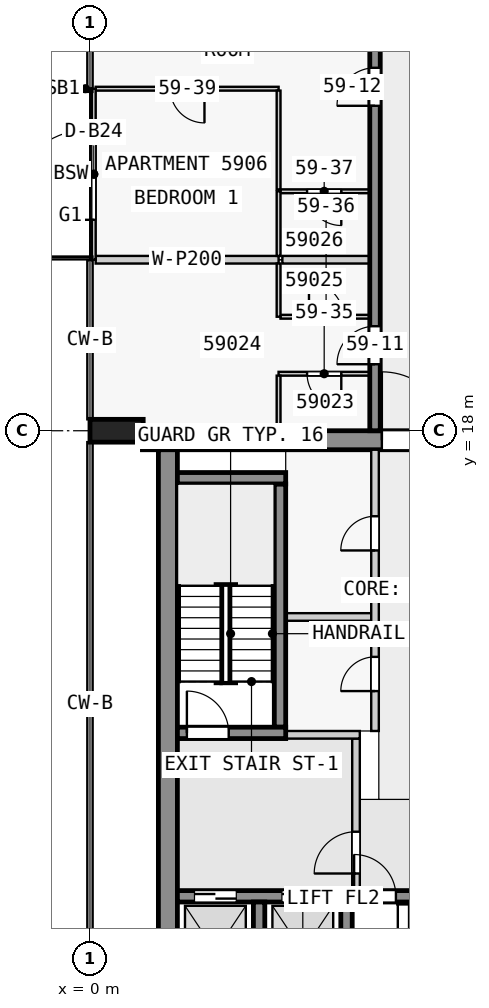
"""IFC4 building model, lengths in metres.
Left out: names, types, materials, properties, quantities, classifications, styles, units other than length and angle.
Written with IfcOpenShell. Run it as: python <this file> out.ifc"""

import sys

from ifc_helpers import new_model, si_unit, direction, frame, frame_2d, origin, origin_2d, place, context, subcontext, project, spatial, rectangle, extrude, element, fill, save


model = new_model("IFC4")
c1 = context("Model", 3, precision=1e-05, world=origin(), true_north=direction((0.0, 1.0)))
c2 = subcontext(c1, "Body", "Model", "MODEL_VIEW")
j1 = project(units=[si_unit("LENGTHUNIT", "METRE"), si_unit("PLANEANGLEUNIT", "RADIAN")], contexts=[c1])
p1 = place(None, origin())
s1 = spatial("IfcSite", under=j1, at=p1, CompositionType="ELEMENT")
p2 = place(p1, origin())
s2 = spatial("IfcBuilding", under=s1, at=p2, CompositionType="ELEMENT")
p3 = place(p2, frame((0.0, 0.0, 225.9)))
s3 = spatial("IfcBuildingStorey", under=s2, at=p3, CompositionType="ELEMENT", Elevation=225.9)
p4 = place(p3, frame((0.7, 18.0, 0.0), z_axis=(0.0, 0.0, 1.0), x_axis=(0.0, 1.0, 0.0)))
e1 = element("IfcColumn", 1, at=p4, inside=s3, PredefinedType="COLUMN", context=c2, shape_type="SweptSolid", body=[
    extrude(rectangle(XDim=0.6, YDim=1.4, at=origin_2d()), origin(), (0.0, 0.0, 1.0), 3.5),
])
p5 = place(p3, frame((1.38, 17.75, 0.0), z_axis=(0.0, 0.0, 1.0), x_axis=(1.0, 0.0, 0.0)))
e2 = element("IfcWall", 2, at=p5, inside=s3, PredefinedType="SHEAR", context=c2, shape_type="SweptSolid", body=[
    extrude(rectangle(XDim=21.12, YDim=0.5, at=frame_2d((10.56, 0.0))), origin(), (0.0, 0.0, 1.0), 3.05),
])
p6 = place(p5, frame((6.3, 0.0, 0.0)))
e3 = element("IfcOpeningElement", 3, at=p6, cuts=e2, PredefinedType="OPENING", context=c2, shape_type="SweptSolid", body=[
    extrude(rectangle(XDim=1.8, YDim=2.1, at=frame_2d((0.9, 1.05))), frame((0.0, 0.26, 0.0), z_axis=(0.0, -1.0, 0.0), x_axis=(1.0, 0.0, 0.0)), (0.0, 0.0, 1.0), 0.52),
])
p7 = place(p3, frame((2.05, 2.5, 0.0), z_axis=(0.0, 0.0, 1.0), x_axis=(0.0, 1.0, 0.0)))
e4 = element("IfcWall", 4, at=p7, inside=s3, PredefinedType="SHEAR", context=c2, shape_type="SweptSolid", body=[
    extrude(rectangle(XDim=15.0, YDim=0.5, at=frame_2d((7.5, 0.0))), origin(), (0.0, 0.0, 1.0), 3.05),
])
for number, where, z_axis, x_axis in (
    (5, (4.45, 2.8, 0.0), (0.0, 0.0, 1.0), (0.0, 1.0, 0.0)),
    (6, (6.75, 2.8, 0.0), (0.0, 0.0, 1.0), (0.0, 1.0, 0.0)),
):
    element("IfcWall", number, at=place(p3, frame(where, z_axis=z_axis, x_axis=x_axis)), inside=s3, PredefinedType="SHEAR", context=c2, shape_type="SweptSolid", body=[
        extrude(rectangle(XDim=2.8, YDim=0.3, at=frame_2d((1.4, 0.0))), origin(), (0.0, 0.0, 1.0), 3.05),
    ])
p8 = place(p3, frame((2.3, 5.75, 0.0), z_axis=(0.0, 0.0, 1.0), x_axis=(1.0, 0.0, 0.0)))
e7 = element("IfcWall", 7, at=p8, inside=s3, PredefinedType="SHEAR", context=c2, shape_type="SweptSolid", body=[
    extrude(rectangle(XDim=18.8, YDim=0.3, at=frame_2d((9.4, 0.0))), origin(), (0.0, 0.0, 1.0), 3.05),
])
p9 = place(p8, frame((4.65, 0.0, 0.0)))
e8 = element("IfcOpeningElement", 8, at=p9, cuts=e7, PredefinedType="OPENING", context=c2, shape_type="SweptSolid", body=[
    extrude(rectangle(XDim=1.1, YDim=2.1, at=frame_2d((0.55, 1.05))), frame((0.0, 0.16, 0.0), z_axis=(0.0, -1.0, 0.0), x_axis=(1.0, 0.0, 0.0)), (0.0, 0.0, 1.0), 0.32),
])
p10 = place(p8, frame((0.45, 0.0, 0.0)))
e9 = element("IfcOpeningElement", 9, at=p10, cuts=e7, PredefinedType="OPENING", context=c2, shape_type="SweptSolid", body=[
    extrude(rectangle(XDim=1.1, YDim=2.1, at=frame_2d((0.55, 1.05))), frame((0.0, 0.16, 0.0), z_axis=(0.0, -1.0, 0.0), x_axis=(1.0, 0.0, 0.0)), (0.0, 0.0, 1.0), 0.32),
])
p11 = place(p8, frame((2.75, 0.0, 0.0)))
e10 = element("IfcOpeningElement", 10, at=p11, cuts=e7, PredefinedType="OPENING", context=c2, shape_type="SweptSolid", body=[
    extrude(rectangle(XDim=1.1, YDim=2.1, at=frame_2d((0.55, 1.05))), frame((0.0, 0.16, 0.0), z_axis=(0.0, -1.0, 0.0), x_axis=(1.0, 0.0, 0.0)), (0.0, 0.0, 1.0), 0.32),
])
p12 = place(p8, frame((11.95, 0.0, 0.0)))
e11 = element("IfcOpeningElement", 11, at=p12, cuts=e7, PredefinedType="OPENING", context=c2, shape_type="SweptSolid", body=[
    extrude(rectangle(XDim=0.9, YDim=2.1, at=frame_2d((0.45, 1.05))), frame((0.0, 0.16, 0.0), z_axis=(0.0, -1.0, 0.0), x_axis=(1.0, 0.0, 0.0)), (0.0, 0.0, 1.0), 0.32),
])
p13 = place(p8, frame((15.7, 0.0, 0.0)))
e12 = element("IfcOpeningElement", 12, at=p13, cuts=e7, PredefinedType="OPENING", context=c2, shape_type="SweptSolid", body=[
    extrude(rectangle(XDim=0.9, YDim=2.1, at=frame_2d((0.45, 1.05))), frame((0.0, 0.16, 0.0), z_axis=(0.0, -1.0, 0.0), x_axis=(1.0, 0.0, 0.0)), (0.0, 0.0, 1.0), 0.32),
])
p14 = place(p3, frame((2.3, 10.05, 0.0), z_axis=(0.0, 0.0, 1.0), x_axis=(1.0, 0.0, 0.0)))
e13 = element("IfcWall", 13, at=p14, inside=s3, PredefinedType="SHEAR", context=c2, shape_type="SweptSolid", body=[
    extrude(rectangle(XDim=2.85, YDim=0.3, at=frame_2d((1.425, 0.0))), origin(), (0.0, 0.0, 1.0), 3.05),
])
p15 = place(p14, frame((0.25, 0.0, 0.0)))
e14 = element("IfcOpeningElement", 14, at=p15, cuts=e13, PredefinedType="OPENING", context=c2, shape_type="SweptSolid", body=[
    extrude(rectangle(XDim=1.1, YDim=2.1, at=frame_2d((0.55, 1.05))), frame((0.0, 0.16, 0.0), z_axis=(0.0, -1.0, 0.0), x_axis=(1.0, 0.0, 0.0)), (0.0, 0.0, 1.0), 0.32),
])
p16 = place(p3, frame((5.0, 10.2, 0.0), z_axis=(0.0, 0.0, 1.0), x_axis=(0.0, 1.0, 0.0)))
e15 = element("IfcWall", 15, at=p16, inside=s3, PredefinedType="SHEAR", context=c2, shape_type="SweptSolid", body=[
    extrude(rectangle(XDim=6.4, YDim=0.3, at=frame_2d((3.2, 0.0))), origin(), (0.0, 0.0, 1.0), 3.05),
])
p17 = place(p3, frame((2.3, 16.75, 0.0), z_axis=(0.0, 0.0, 1.0), x_axis=(1.0, 0.0, 0.0)))
e16 = element("IfcWall", 16, at=p17, inside=s3, PredefinedType="SHEAR", context=c2, shape_type="SweptSolid", body=[
    extrude(rectangle(XDim=2.85, YDim=0.3, at=frame_2d((1.425, 0.0))), origin(), (0.0, 0.0, 1.0), 3.05),
])
p18 = place(p3, frame((7.5, 18.0, 0.0), z_axis=(0.0, 0.0, 1.0), x_axis=(0.0, 1.0, 0.0)))
e17 = element("IfcWall", 17, at=p18, inside=s3, PredefinedType="SHEAR", context=c2, shape_type="SweptSolid", body=[
    extrude(rectangle(XDim=27.0, YDim=0.275, at=frame_2d((13.5, 0.0))), origin(), (0.0, 0.0, 1.0), 3.05),
])
p19 = place(p18, frame((1.75, 0.0, 0.0)))
e18 = element("IfcOpeningElement", 18, at=p19, cuts=e17, PredefinedType="OPENING", context=c2, shape_type="SweptSolid", body=[
    extrude(rectangle(XDim=1.0, YDim=2.1, at=frame_2d((0.5, 1.05))), frame((0.0, 0.147, 0.0), z_axis=(0.0, -1.0, 0.0), x_axis=(1.0, 0.0, 0.0)), (0.0, 0.0, 1.0), 0.295),
])
p20 = place(p18, frame((8.55, 0.0, 0.0)))
e19 = element("IfcOpeningElement", 19, at=p20, cuts=e17, PredefinedType="OPENING", context=c2, shape_type="SweptSolid", body=[
    extrude(rectangle(XDim=1.0, YDim=2.1, at=frame_2d((0.5, 1.05))), frame((0.0, 0.147, 0.0), z_axis=(0.0, -1.0, 0.0), x_axis=(1.0, 0.0, 0.0)), (0.0, 0.0, 1.0), 0.295),
])
p21 = place(p18, frame((17.55, 0.0, 0.0)))
e20 = element("IfcOpeningElement", 20, at=p21, cuts=e17, PredefinedType="OPENING", context=c2, shape_type="SweptSolid", body=[
    extrude(rectangle(XDim=1.0, YDim=2.1, at=frame_2d((0.5, 1.05))), frame((0.0, 0.147, 0.0), z_axis=(0.0, -1.0, 0.0), x_axis=(1.0, 0.0, 0.0)), (0.0, 0.0, 1.0), 0.295),
])
p22 = place(p18, frame((23.25, 0.0, 0.0)))
e21 = element("IfcOpeningElement", 21, at=p22, cuts=e17, PredefinedType="OPENING", context=c2, shape_type="SweptSolid", body=[
    extrude(rectangle(XDim=0.9, YDim=2.1, at=frame_2d((0.45, 1.05))), frame((0.0, 0.147, 0.0), z_axis=(0.0, -1.0, 0.0), x_axis=(1.0, 0.0, 0.0)), (0.0, 0.0, 1.0), 0.295),
])
p23 = place(p18, frame((25.45, 0.0, 0.0)))
e22 = element("IfcOpeningElement", 22, at=p23, cuts=e17, PredefinedType="OPENING", context=c2, shape_type="SweptSolid", body=[
    extrude(rectangle(XDim=1.0, YDim=2.1, at=frame_2d((0.5, 1.05))), frame((0.0, 0.147, 0.0), z_axis=(0.0, -1.0, 0.0), x_axis=(1.0, 0.0, 0.0)), (0.0, 0.0, 1.0), 0.295),
])
p24 = place(p3, frame((0.1, 22.5, 0.0), z_axis=(0.0, 0.0, 1.0), x_axis=(0.0, 1.0, 0.0)))
e23 = element("IfcWall", 23, at=p24, inside=s3, PredefinedType="STANDARD", context=c2, shape_type="SweptSolid", body=[
    extrude(rectangle(XDim=4.5, YDim=0.1, at=frame_2d((2.25, 0.0))), origin(), (0.0, 0.0, 1.0), 3.05),
])
p25 = place(p24, frame((1.05, 0.0, 0.0)))
e24 = element("IfcOpeningElement", 24, at=p25, cuts=e23, PredefinedType="OPENING", context=c2, shape_type="SweptSolid", body=[
    extrude(rectangle(XDim=2.4, YDim=2.4, at=frame_2d((1.2, 1.2))), frame((0.0, 0.06, 0.0), z_axis=(0.0, -1.0, 0.0), x_axis=(1.0, 0.0, 0.0)), (0.0, 0.0, 1.0), 0.12),
])
p26 = place(p3, frame((7.0, 5.9, 0.0), z_axis=(0.0, 0.0, 1.0), x_axis=(0.0, 1.0, 0.0)))
e25 = element("IfcWall", 25, at=p26, inside=s3, PredefinedType="PARTITIONING", context=c2, shape_type="SweptSolid", body=[
    extrude(rectangle(XDim=4.0, YDim=0.2, at=frame_2d((2.0, 0.0))), origin(), (0.0, 0.0, 1.0), 3.05),
])
p27 = place(p26, frame((0.45, 0.0, 0.0)))
e26 = element("IfcOpeningElement", 26, at=p27, cuts=e25, PredefinedType="OPENING", context=c2, shape_type="SweptSolid", body=[
    extrude(rectangle(XDim=1.1, YDim=2.1, at=frame_2d((0.55, 1.05))), frame((0.0, 0.11, 0.0), z_axis=(0.0, -1.0, 0.0), x_axis=(1.0, 0.0, 0.0)), (0.0, 0.0, 1.0), 0.22),
])
p28 = place(p3, frame((5.15, 10.0, 0.0), z_axis=(0.0, 0.0, 1.0), x_axis=(1.0, 0.0, 0.0)))
e27 = element("IfcWall", 27, at=p28, inside=s3, PredefinedType="PARTITIONING", context=c2, shape_type="SweptSolid", body=[
    extrude(rectangle(XDim=1.95, YDim=0.2, at=frame_2d((0.975, 0.0))), origin(), (0.0, 0.0, 1.0), 3.05),
])
p29 = place(p3, frame((7.5, 10.1, 0.0), z_axis=(0.0, 0.0, 1.0), x_axis=(0.0, 1.0, 0.0)))
e28 = element("IfcWall", 28, at=p29, inside=s3, PredefinedType="PARTITIONING", context=c2, shape_type="SweptSolid", body=[
    extrude(rectangle(XDim=7.4, YDim=0.2, at=frame_2d((3.7, 0.0))), origin(), (0.0, 0.0, 1.0), 3.05),
])
p30 = place(p29, frame((1.05, 0.0, 0.0)))
e29 = element("IfcOpeningElement", 29, at=p30, cuts=e28, PredefinedType="OPENING", context=c2, shape_type="SweptSolid", body=[
    extrude(rectangle(XDim=0.9, YDim=2.1, at=frame_2d((0.45, 1.05))), frame((0.0, 0.11, 0.0), z_axis=(0.0, -1.0, 0.0), x_axis=(1.0, 0.0, 0.0)), (0.0, 0.0, 1.0), 0.22),
])
p31 = place(p29, frame((4.75, 0.0, 0.0)))
e30 = element("IfcOpeningElement", 30, at=p31, cuts=e28, PredefinedType="OPENING", context=c2, shape_type="SweptSolid", body=[
    extrude(rectangle(XDim=0.9, YDim=2.1, at=frame_2d((0.45, 1.05))), frame((0.0, 0.11, 0.0), z_axis=(0.0, -1.0, 0.0), x_axis=(1.0, 0.0, 0.0)), (0.0, 0.0, 1.0), 0.22),
])
p32 = place(p3, frame((5.15, 13.1, 0.0), z_axis=(0.0, 0.0, 1.0), x_axis=(1.0, 0.0, 0.0)))
e31 = element("IfcWall", 31, at=p32, inside=s3, PredefinedType="PARTITIONING", context=c2, shape_type="SweptSolid", body=[
    extrude(rectangle(XDim=2.25, YDim=0.2, at=frame_2d((1.125, 0.0))), origin(), (0.0, 0.0, 1.0), 3.05),
])
p33 = place(p3, frame((7.363, 19.5, 0.0), z_axis=(0.0, 0.0, 1.0), x_axis=(-1.0, 0.0, 0.0)))
e32 = element("IfcWall", 32, at=p33, inside=s3, PredefinedType="PARTITIONING", context=c2, shape_type="SweptSolid", body=[
    extrude(rectangle(XDim=2.4, YDim=0.1, at=frame_2d((1.2, 0.0))), origin(), (0.0, 0.0, 1.0), 3.05),
])
p34 = place(p33, frame((0.75, 0.0, 0.0)))
e33 = element("IfcOpeningElement", 33, at=p34, cuts=e32, PredefinedType="OPENING", context=c2, shape_type="SweptSolid", body=[
    extrude(rectangle(XDim=0.9, YDim=2.1, at=frame_2d((0.45, 1.05))), frame((0.0, 0.06, 0.0), z_axis=(0.0, -1.0, 0.0), x_axis=(1.0, 0.0, 0.0)), (0.0, 0.0, 1.0), 0.12),
])
p35 = place(p3, frame((5.012, 21.0, 0.0), z_axis=(0.0, 0.0, 1.0), x_axis=(1.0, 0.0, 0.0)))
e34 = element("IfcWall", 34, at=p35, inside=s3, PredefinedType="PARTITIONING", context=c2, shape_type="SweptSolid", body=[
    extrude(rectangle(XDim=2.35, YDim=0.1, at=frame_2d((1.175, 0.0))), origin(), (0.0, 0.0, 1.0), 3.05),
])
p36 = place(p35, frame((0.75, 0.0, 0.0)))
e35 = element("IfcOpeningElement", 35, at=p36, cuts=e34, PredefinedType="OPENING", context=c2, shape_type="SweptSolid", body=[
    extrude(rectangle(XDim=0.9, YDim=2.1, at=frame_2d((0.45, 1.05))), frame((0.0, 0.06, 0.0), z_axis=(0.0, -1.0, 0.0), x_axis=(1.0, 0.0, 0.0)), (0.0, 0.0, 1.0), 0.12),
])
p37 = place(p3, frame((7.363, 22.5, 0.0), z_axis=(0.0, 0.0, 1.0), x_axis=(-1.0, 0.0, 0.0)))
e36 = element("IfcWall", 36, at=p37, inside=s3, PredefinedType="PARTITIONING", context=c2, shape_type="SweptSolid", body=[
    extrude(rectangle(XDim=2.3, YDim=0.2, at=frame_2d((1.15, 0.0))), origin(), (0.0, 0.0, 1.0), 3.05),
])
p38 = place(p3, frame((0.15, 22.5, 0.0), z_axis=(0.0, 0.0, 1.0), x_axis=(1.0, 0.0, 0.0)))
e37 = element("IfcWall", 37, at=p38, inside=s3, PredefinedType="PARTITIONING", context=c2, shape_type="SweptSolid", body=[
    extrude(rectangle(XDim=4.812, YDim=0.2, at=frame_2d((2.406, 0.0))), origin(), (0.0, 0.0, 1.0), 3.05),
])
p39 = place(p3, frame((7.363, 24.3, 0.0), z_axis=(0.0, 0.0, 1.0), x_axis=(-1.0, 0.0, 0.0)))
e38 = element("IfcWall", 38, at=p39, inside=s3, PredefinedType="PARTITIONING", context=c2, shape_type="SweptSolid", body=[
    extrude(rectangle(XDim=2.35, YDim=0.1, at=frame_2d((1.175, 0.0))), origin(), (0.0, 0.0, 1.0), 3.05),
])
p40 = place(p39, frame((0.75, 0.0, 0.0)))
e39 = element("IfcOpeningElement", 39, at=p40, cuts=e38, PredefinedType="OPENING", context=c2, shape_type="SweptSolid", body=[
    extrude(rectangle(XDim=0.9, YDim=2.1, at=frame_2d((0.45, 1.05))), frame((0.0, 0.06, 0.0), z_axis=(0.0, -1.0, 0.0), x_axis=(1.0, 0.0, 0.0)), (0.0, 0.0, 1.0), 0.12),
])
p41 = place(p3, frame((4.962, 27.0, 0.0), z_axis=(0.0, 0.0, 1.0), x_axis=(-1.0, 0.0, 0.0)))
e40 = element("IfcWall", 40, at=p41, inside=s3, PredefinedType="PARTITIONING", context=c2, shape_type="SweptSolid", body=[
    extrude(rectangle(XDim=4.812, YDim=0.1, at=frame_2d((2.406, 0.0))), origin(), (0.0, 0.0, 1.0), 3.05),
])
p42 = place(p41, frame((1.95, 0.0, 0.0)))
e41 = element("IfcOpeningElement", 41, at=p42, cuts=e40, PredefinedType="OPENING", context=c2, shape_type="SweptSolid", body=[
    extrude(rectangle(XDim=0.9, YDim=2.1, at=frame_2d((0.45, 1.05))), frame((0.0, 0.06, 0.0), z_axis=(0.0, -1.0, 0.0), x_axis=(1.0, 0.0, 0.0)), (0.0, 0.0, 1.0), 0.12),
])
p43 = place(p3, frame((4.962, 19.45, 0.0), z_axis=(0.0, 0.0, 1.0), x_axis=(0.0, -1.0, 0.0)))
e42 = element("IfcWall", 42, at=p43, inside=s3, PredefinedType="PARTITIONING", context=c2, shape_type="SweptSolid", body=[
    extrude(rectangle(XDim=1.45, YDim=0.1, at=frame_2d((0.725, 0.0))), origin(), (0.0, 0.0, 1.0), 3.05),
])
p44 = place(p3, frame((4.962, 22.4, 0.0), z_axis=(0.0, 0.0, 1.0), x_axis=(0.0, -1.0, 0.0)))
e43 = element("IfcWall", 43, at=p44, inside=s3, PredefinedType="PARTITIONING", context=c2, shape_type="SweptSolid", body=[
    extrude(rectangle(XDim=1.4, YDim=0.1, at=frame_2d((0.7, 0.0))), origin(), (0.0, 0.0, 1.0), 3.05),
])
p45 = place(p3, frame((4.962, 24.3, 0.0), z_axis=(0.0, 0.0, 1.0), x_axis=(0.0, -1.0, 0.0)))
e44 = element("IfcWall", 44, at=p45, inside=s3, PredefinedType="PARTITIONING", context=c2, shape_type="SweptSolid", body=[
    extrude(rectangle(XDim=1.7, YDim=0.1, at=frame_2d((0.85, 0.0))), origin(), (0.0, 0.0, 1.0), 3.05),
])
p46 = place(p3, frame((4.962, 24.35, 0.0), z_axis=(0.0, 0.0, 1.0), x_axis=(0.0, 1.0, 0.0)))
e45 = element("IfcWall", 45, at=p46, inside=s3, PredefinedType="PARTITIONING", context=c2, shape_type="SweptSolid", body=[
    extrude(rectangle(XDim=2.6, YDim=0.1, at=frame_2d((1.3, 0.0))), origin(), (0.0, 0.0, 1.0), 3.05),
])
p47 = place(p25, origin())
e46 = element("IfcDoor", 46, at=p47, inside=s3, OperationType="SINGLE_SWING_LEFT", PredefinedType="DOOR", context=c2, shape_type="SweptSolid", body=[
    extrude(rectangle(XDim=2.4, YDim=2.4, at=frame_2d((1.2, 1.2))), frame((0.0, 0.025, 0.0), z_axis=(0.0, -1.0, 0.0), x_axis=(1.0, 0.0, 0.0)), (0.0, 0.0, 1.0), 0.05),
])
fill(e24, e46)
p48 = place(p27, origin())
e47 = element("IfcDoor", 47, at=p48, inside=s3, OperationType="SINGLE_SWING_LEFT", PredefinedType="DOOR", context=c2, shape_type="SweptSolid", body=[
    extrude(rectangle(XDim=1.1, YDim=2.1, at=frame_2d((0.55, 1.05))), frame((0.0, 0.025, 0.0), z_axis=(0.0, -1.0, 0.0), x_axis=(1.0, 0.0, 0.0)), (0.0, 0.0, 1.0), 0.05),
])
fill(e26, e47)
p49 = place(p15, origin())
e48 = element("IfcDoor", 48, at=p49, inside=s3, OperationType="SINGLE_SWING_RIGHT", PredefinedType="DOOR", context=c2, shape_type="SweptSolid", body=[
    extrude(rectangle(XDim=1.1, YDim=2.1, at=frame_2d((0.55, 1.05))), frame((0.0, 0.025, 0.0), z_axis=(0.0, -1.0, 0.0), x_axis=(1.0, 0.0, 0.0)), (0.0, 0.0, 1.0), 0.05),
])
fill(e14, e48)
p50 = place(p9, origin())
e49 = element("IfcDoor", 49, at=p50, inside=s3, OperationType="SINGLE_SWING_LEFT", PredefinedType="DOOR", context=c2, shape_type="SweptSolid", body=[
    extrude(rectangle(XDim=1.1, YDim=2.1, at=frame_2d((0.55, 1.05))), frame((0.0, 0.025, 0.0), z_axis=(0.0, -1.0, 0.0), x_axis=(1.0, 0.0, 0.0)), (0.0, 0.0, 1.0), 0.05),
])
fill(e8, e49)
p51 = place(p10, origin())
e50 = element("IfcDoor", 50, at=p51, inside=s3, OperationType="DOUBLE_DOOR_SLIDING", PredefinedType="DOOR", context=c2, shape_type="SweptSolid", body=[
    extrude(rectangle(XDim=1.1, YDim=2.1, at=frame_2d((0.55, 1.05))), frame((0.0, 0.025, 0.0), z_axis=(0.0, -1.0, 0.0), x_axis=(1.0, 0.0, 0.0)), (0.0, 0.0, 1.0), 0.05),
])
fill(e9, e50)
p52 = place(p11, origin())
e51 = element("IfcDoor", 51, at=p52, inside=s3, OperationType="DOUBLE_DOOR_SLIDING", PredefinedType="DOOR", context=c2, shape_type="SweptSolid", body=[
    extrude(rectangle(XDim=1.1, YDim=2.1, at=frame_2d((0.55, 1.05))), frame((0.0, 0.025, 0.0), z_axis=(0.0, -1.0, 0.0), x_axis=(1.0, 0.0, 0.0)), (0.0, 0.0, 1.0), 0.05),
])
fill(e10, e51)
p53 = place(p6, origin())
e52 = element("IfcDoor", 52, at=p53, inside=s3, OperationType="DOUBLE_DOOR_SINGLE_SWING", PredefinedType="DOOR", context=c2, shape_type="SweptSolid", body=[
    extrude(rectangle(XDim=1.8, YDim=2.1, at=frame_2d((0.9, 1.05))), frame((0.0, 0.025, 0.0), z_axis=(0.0, -1.0, 0.0), x_axis=(1.0, 0.0, 0.0)), (0.0, 0.0, 1.0), 0.05),
])
fill(e3, e52)
p54 = place(p30, origin())
e53 = element("IfcDoor", 53, at=p54, inside=s3, OperationType="SINGLE_SWING_RIGHT", PredefinedType="DOOR", context=c2, shape_type="SweptSolid", body=[
    extrude(rectangle(XDim=0.9, YDim=2.1, at=frame_2d((0.45, 1.05))), frame((0.0, 0.025, 0.0), z_axis=(0.0, -1.0, 0.0), x_axis=(1.0, 0.0, 0.0)), (0.0, 0.0, 1.0), 0.05),
])
fill(e29, e53)
p55 = place(p31, origin())
e54 = element("IfcDoor", 54, at=p55, inside=s3, OperationType="SINGLE_SWING_RIGHT", PredefinedType="DOOR", context=c2, shape_type="SweptSolid", body=[
    extrude(rectangle(XDim=0.9, YDim=2.1, at=frame_2d((0.45, 1.05))), frame((0.0, 0.025, 0.0), z_axis=(0.0, -1.0, 0.0), x_axis=(1.0, 0.0, 0.0)), (0.0, 0.0, 1.0), 0.05),
])
fill(e30, e54)
p56 = place(p19, origin())
e55 = element("IfcDoor", 55, at=p56, inside=s3, OperationType="SINGLE_SWING_LEFT", PredefinedType="DOOR", context=c2, shape_type="SweptSolid", body=[
    extrude(rectangle(XDim=1.0, YDim=2.1, at=frame_2d((0.5, 1.05))), frame((0.0, 0.025, 0.0), z_axis=(0.0, -1.0, 0.0), x_axis=(1.0, 0.0, 0.0)), (0.0, 0.0, 1.0), 0.05),
])
fill(e18, e55)
p57 = place(p20, origin())
e56 = element("IfcDoor", 56, at=p57, inside=s3, OperationType="SINGLE_SWING_LEFT", PredefinedType="DOOR", context=c2, shape_type="SweptSolid", body=[
    extrude(rectangle(XDim=1.0, YDim=2.1, at=frame_2d((0.5, 1.05))), frame((0.0, 0.025, 0.0), z_axis=(0.0, -1.0, 0.0), x_axis=(1.0, 0.0, 0.0)), (0.0, 0.0, 1.0), 0.05),
])
fill(e19, e56)
p58 = place(p34, origin())
e57 = element("IfcDoor", 57, at=p58, inside=s3, OperationType="SINGLE_SWING_RIGHT", PredefinedType="DOOR", context=c2, shape_type="SweptSolid", body=[
    extrude(rectangle(XDim=0.9, YDim=2.1, at=frame_2d((0.45, 1.05))), frame((0.0, 0.025, 0.0), z_axis=(0.0, -1.0, 0.0), x_axis=(1.0, 0.0, 0.0)), (0.0, 0.0, 1.0), 0.05),
])
fill(e33, e57)
p59 = place(p36, origin())
e58 = element("IfcDoor", 58, at=p59, inside=s3, OperationType="SINGLE_SWING_RIGHT", PredefinedType="DOOR", context=c2, shape_type="SweptSolid", body=[
    extrude(rectangle(XDim=0.9, YDim=2.1, at=frame_2d((0.45, 1.05))), frame((0.0, 0.025, 0.0), z_axis=(0.0, -1.0, 0.0), x_axis=(1.0, 0.0, 0.0)), (0.0, 0.0, 1.0), 0.05),
])
fill(e35, e58)
p60 = place(p40, origin())
e59 = element("IfcDoor", 59, at=p60, inside=s3, OperationType="SINGLE_SWING_RIGHT", PredefinedType="DOOR", context=c2, shape_type="SweptSolid", body=[
    extrude(rectangle(XDim=0.9, YDim=2.1, at=frame_2d((0.45, 1.05))), frame((0.0, 0.025, 0.0), z_axis=(0.0, -1.0, 0.0), x_axis=(1.0, 0.0, 0.0)), (0.0, 0.0, 1.0), 0.05),
])
fill(e39, e59)
p61 = place(p42, origin())
e60 = element("IfcDoor", 60, at=p61, inside=s3, OperationType="SINGLE_SWING_LEFT", PredefinedType="DOOR", context=c2, shape_type="SweptSolid", body=[
    extrude(rectangle(XDim=0.9, YDim=2.1, at=frame_2d((0.45, 1.05))), frame((0.0, 0.025, 0.0), z_axis=(0.0, -1.0, 0.0), x_axis=(1.0, 0.0, 0.0)), (0.0, 0.0, 1.0), 0.05),
])
fill(e41, e60)
save(model, sys.argv[1])
